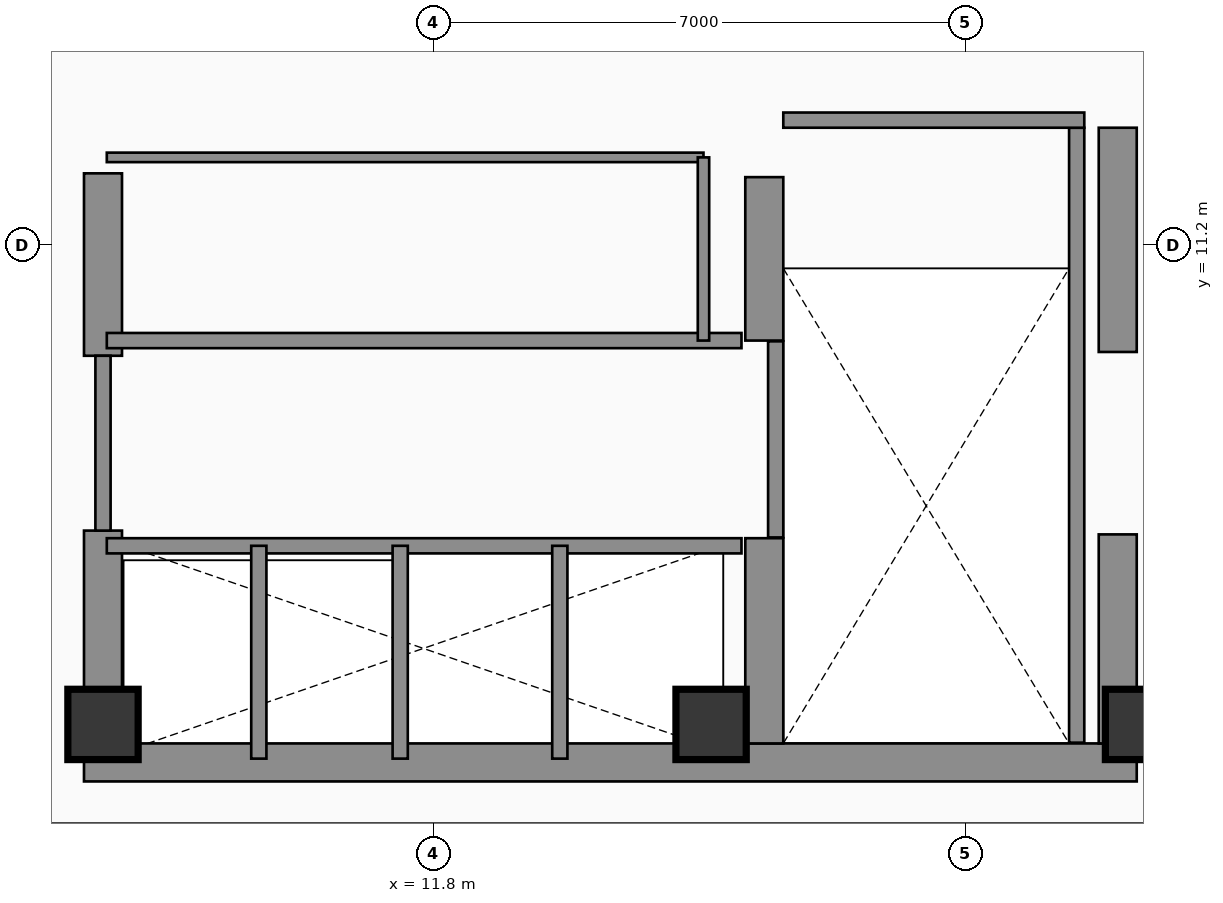
"""IFC4 building model, lengths in metres.
Left out: names, types, materials, properties, quantities, classifications, styles, units other than length and angle.
Written with IfcOpenShell. Run it as: python <this file> out.ifc"""

import sys

from ifc_helpers import new_model, si_unit, direction, frame, frame_2d, origin, origin_2d, place, context, subcontext, project, spatial, rectangle, extrude, element, fill, save


model = new_model("IFC4")
c1 = context("Model", 3, precision=1e-05, world=origin(), true_north=direction((0.0, 1.0)))
c2 = subcontext(c1, "Body", "Model", "MODEL_VIEW")
j1 = project(units=[si_unit("LENGTHUNIT", "METRE"), si_unit("PLANEANGLEUNIT", "RADIAN")], contexts=[c1])
p1 = place(None, origin())
s1 = spatial("IfcSite", under=j1, at=p1, CompositionType="ELEMENT")
p2 = place(p1, origin())
s2 = spatial("IfcBuilding", under=s1, at=p2, CompositionType="ELEMENT")
p3 = place(p2, frame((0.0, 0.0, 344.2)))
s3 = spatial("IfcBuildingStorey", under=s2, at=p3, CompositionType="ELEMENT", Elevation=344.2)
p4 = place(p3, frame((7.2, 4.4, 0.0), z_axis=(0.0, 0.0, 1.0), x_axis=(1.0, 0.0, 0.0)))
e1 = element("IfcWall", 1, at=p4, inside=s3, PredefinedType="SHEAR", context=c2, shape_type="SweptSolid", body=[
    extrude(rectangle(XDim=13.85, YDim=0.5, at=frame_2d((6.925, 0.0))), origin(), (0.0, 0.0, 1.0), 3.66),
])
p5 = place(p3, frame((7.45, 4.65, 0.0), z_axis=(0.0, 0.0, 1.0), x_axis=(0.0, 1.0, 0.0)))
e2 = element("IfcWall", 2, at=p5, inside=s3, PredefinedType="SHEAR", context=c2, shape_type="SweptSolid", body=[
    extrude(rectangle(XDim=2.8, YDim=0.5, at=frame_2d((1.4, 0.0))), origin(), (0.0, 0.0, 1.0), 3.66),
])
p6 = place(p3, frame((7.45, 9.75, 0.0), z_axis=(0.0, 0.0, 1.0), x_axis=(0.0, 1.0, 0.0)))
e3 = element("IfcWall", 3, at=p6, inside=s3, PredefinedType="SHEAR", context=c2, shape_type="SweptSolid", body=[
    extrude(rectangle(XDim=2.4, YDim=0.5, at=frame_2d((1.2, 0.0))), origin(), (0.0, 0.0, 1.0), 3.66),
])
p7 = place(p3, frame((20.8, 4.65, 0.0), z_axis=(0.0, 0.0, 1.0), x_axis=(0.0, 1.0, 0.0)))
e4 = element("IfcWall", 4, at=p7, inside=s3, PredefinedType="SHEAR", context=c2, shape_type="SweptSolid", body=[
    extrude(rectangle(XDim=2.75, YDim=0.5, at=frame_2d((1.375, 0.0))), origin(), (0.0, 0.0, 1.0), 3.66),
])
p8 = place(p3, frame((20.8, 9.8, 0.0), z_axis=(0.0, 0.0, 1.0), x_axis=(0.0, 1.0, 0.0)))
e5 = element("IfcWall", 5, at=p8, inside=s3, PredefinedType="SHEAR", context=c2, shape_type="SweptSolid", body=[
    extrude(rectangle(XDim=2.95, YDim=0.5, at=frame_2d((1.475, 0.0))), origin(), (0.0, 0.0, 1.0), 3.66),
])
p9 = place(p3, frame((16.15, 4.65, 0.0), z_axis=(0.0, 0.0, 1.0), x_axis=(0.0, 1.0, 0.0)))
e6 = element("IfcWall", 6, at=p9, inside=s3, PredefinedType="SHEAR", context=c2, shape_type="SweptSolid", body=[
    extrude(rectangle(XDim=2.7, YDim=0.5, at=frame_2d((1.35, 0.0))), origin(), (0.0, 0.0, 1.0), 3.66),
])
p10 = place(p3, frame((16.15, 9.95, 0.0), z_axis=(0.0, 0.0, 1.0), x_axis=(0.0, 1.0, 0.0)))
e7 = element("IfcWall", 7, at=p10, inside=s3, PredefinedType="SHEAR", context=c2, shape_type="SweptSolid", body=[
    extrude(rectangle(XDim=2.15, YDim=0.5, at=frame_2d((1.075, 0.0))), origin(), (0.0, 0.0, 1.0), 3.66),
])
for number, where, z_axis, x_axis in (
    (8, (7.45, 4.9, 0.0), (0.0, 0.0, 1.0), (1.0, 0.0, 0.0)),
    (9, (15.45, 4.9, 0.0), (0.0, 0.0, 1.0), (1.0, 0.0, 0.0)),
    (10, (21.1, 4.9, 0.0), (0.0, 0.0, 1.0), (1.0, 0.0, 0.0)),
):
    element("IfcColumn", number, at=place(p3, frame(where, z_axis=z_axis, x_axis=x_axis)), inside=s3, PredefinedType="COLUMN", context=c2, shape_type="SweptSolid", body=[
        extrude(rectangle(XDim=0.9, YDim=0.9, at=origin_2d()), origin(), (0.0, 0.0, 1.0), 3.66),
    ])
p11 = place(p3, frame((16.3, 7.36, 0.0), z_axis=(0.0, 0.0, 1.0), x_axis=(0.0, 1.0, 0.0)))
e11 = element("IfcWall", 11, at=p11, inside=s3, PredefinedType="SHEAR", context=c2, shape_type="SweptSolid", body=[
    extrude(rectangle(XDim=2.58, YDim=0.2, at=frame_2d((1.29, 0.0))), origin(), (0.0, 0.0, 1.0), 3.66),
])
p12 = place(p3, frame((20.26, 4.66, 0.0), z_axis=(0.0, 0.0, 1.0), x_axis=(0.0, 1.0, 0.0)))
e12 = element("IfcWall", 12, at=p12, inside=s3, PredefinedType="SHEAR", context=c2, shape_type="SweptSolid", body=[
    extrude(rectangle(XDim=8.09, YDim=0.2, at=frame_2d((4.045, 0.0))), origin(), (0.0, 0.0, 1.0), 3.66),
])
p13 = place(p3, frame((16.4, 12.85, 0.0), z_axis=(0.0, 0.0, 1.0), x_axis=(1.0, 0.0, 0.0)))
e13 = element("IfcWall", 13, at=p13, inside=s3, PredefinedType="PARTITIONING", context=c2, shape_type="SweptSolid", body=[
    extrude(rectangle(XDim=3.96, YDim=0.2, at=frame_2d((1.98, 0.0))), origin(), (0.0, 0.0, 1.0), 3.66),
])
p14 = place(p13, frame((1.304, 0.0, 0.0)))
e14 = element("IfcOpeningElement", 14, at=p14, cuts=e13, PredefinedType="OPENING", context=c2, shape_type="SweptSolid", body=[
    extrude(rectangle(XDim=1.1, YDim=2.2, at=frame_2d((0.55, 1.1))), frame((0.0, 0.11, 0.0), z_axis=(0.0, -1.0, 0.0), x_axis=(1.0, 0.0, 0.0)), (0.0, 0.0, 1.0), 0.22),
])
p15 = place(p3, frame((7.5, 7.25, 0.0), z_axis=(0.0, 0.0, 1.0), x_axis=(1.0, 0.0, 0.0)))
e15 = element("IfcWall", 15, at=p15, inside=s3, PredefinedType="PARTITIONING", context=c2, shape_type="SweptSolid", body=[
    extrude(rectangle(XDim=8.35, YDim=0.2, at=frame_2d((4.175, 0.0))), origin(), (0.0, 0.0, 1.0), 3.66),
])
p16 = place(p15, frame((0.53, 0.0, 0.0)))
e16 = element("IfcOpeningElement", 16, at=p16, cuts=e15, PredefinedType="OPENING", context=c2, shape_type="SweptSolid", body=[
    extrude(rectangle(XDim=1.1, YDim=2.2, at=frame_2d((0.55, 1.1))), frame((0.0, 0.11, 0.0), z_axis=(0.0, -1.0, 0.0), x_axis=(1.0, 0.0, 0.0)), (0.0, 0.0, 1.0), 0.22),
])
p17 = place(p15, frame((2.37, 0.0, 0.0)))
e17 = element("IfcOpeningElement", 17, at=p17, cuts=e15, PredefinedType="OPENING", context=c2, shape_type="SweptSolid", body=[
    extrude(rectangle(XDim=1.1, YDim=2.2, at=frame_2d((0.55, 1.1))), frame((0.0, 0.11, 0.0), z_axis=(0.0, -1.0, 0.0), x_axis=(1.0, 0.0, 0.0)), (0.0, 0.0, 1.0), 0.22),
])
p18 = place(p15, frame((4.33, 0.0, 0.0)))
e18 = element("IfcOpeningElement", 18, at=p18, cuts=e15, PredefinedType="OPENING", context=c2, shape_type="SweptSolid", body=[
    extrude(rectangle(XDim=1.1, YDim=2.2, at=frame_2d((0.55, 1.1))), frame((0.0, 0.11, 0.0), z_axis=(0.0, -1.0, 0.0), x_axis=(1.0, 0.0, 0.0)), (0.0, 0.0, 1.0), 0.22),
])
p19 = place(p15, frame((6.5, 0.0, 0.0)))
e19 = element("IfcOpeningElement", 19, at=p19, cuts=e15, PredefinedType="OPENING", context=c2, shape_type="SweptSolid", body=[
    extrude(rectangle(XDim=1.1, YDim=2.2, at=frame_2d((0.55, 1.1))), frame((0.0, 0.11, 0.0), z_axis=(0.0, -1.0, 0.0), x_axis=(1.0, 0.0, 0.0)), (0.0, 0.0, 1.0), 0.22),
])
p20 = place(p3, frame((7.5, 9.95, 0.0), z_axis=(0.0, 0.0, 1.0), x_axis=(1.0, 0.0, 0.0)))
e20 = element("IfcWall", 20, at=p20, inside=s3, PredefinedType="PARTITIONING", context=c2, shape_type="SweptSolid", body=[
    extrude(rectangle(XDim=8.35, YDim=0.2, at=frame_2d((4.175, 0.0))), origin(), (0.0, 0.0, 1.0), 3.66),
])
for number, where, z_axis, x_axis in (
    (21, (9.5, 4.45, 0.0), (0.0, 0.0, 1.0), (0.0, 1.0, 0.0)),
    (22, (11.36, 4.45, 0.0), (0.0, 0.0, 1.0), (0.0, 1.0, 0.0)),
    (23, (13.46, 4.45, 0.0), (0.0, 0.0, 1.0), (0.0, 1.0, 0.0)),
):
    element("IfcWall", number, at=place(p3, frame(where, z_axis=z_axis, x_axis=x_axis)), inside=s3, PredefinedType="PARTITIONING", context=c2, shape_type="SweptSolid", body=[
        extrude(rectangle(XDim=2.8, YDim=0.2, at=frame_2d((1.4, 0.0))), origin(), (0.0, 0.0, 1.0), 3.66),
    ])
p21 = place(p3, frame((7.45, 7.45, 0.0), z_axis=(0.0, 0.0, 1.0), x_axis=(0.0, 1.0, 0.0)))
e24 = element("IfcWall", 24, at=p21, inside=s3, PredefinedType="PARTITIONING", context=c2, shape_type="SweptSolid", body=[
    extrude(rectangle(XDim=2.3, YDim=0.2, at=frame_2d((1.15, 0.0))), origin(), (0.0, 0.0, 1.0), 2.64),
])
p22 = place(p21, frame((0.633, 0.0, 0.0)))
e25 = element("IfcOpeningElement", 25, at=p22, cuts=e24, PredefinedType="OPENING", context=c2, shape_type="SweptSolid", body=[
    extrude(rectangle(XDim=1.2, YDim=2.25, at=frame_2d((0.6, 1.125))), frame((0.0, 0.11, 0.0), z_axis=(0.0, -1.0, 0.0), x_axis=(1.0, 0.0, 0.0)), (0.0, 0.0, 1.0), 0.22),
])
p23 = place(p3, frame((7.5, 12.36, 0.0), z_axis=(0.0, 0.0, 1.0), x_axis=(1.0, 0.0, 0.0)))
e26 = element("IfcWall", 26, at=p23, inside=s3, PredefinedType="PARTITIONING", context=c2, shape_type="SweptSolid", body=[
    extrude(rectangle(XDim=7.85, YDim=0.125, at=frame_2d((3.925, 0.0))), origin(), (0.0, 0.0, 1.0), 3.66),
])
p24 = place(p23, frame((3.775, 0.0, 0.0)))
e27 = element("IfcOpeningElement", 27, at=p24, cuts=e26, PredefinedType="OPENING", context=c2, shape_type="SweptSolid", body=[
    extrude(rectangle(XDim=0.95, YDim=2.15, at=frame_2d((0.475, 1.075))), frame((0.0, 0.073, 0.0), z_axis=(0.0, -1.0, 0.0), x_axis=(1.0, 0.0, 0.0)), (0.0, 0.0, 1.0), 0.145),
])
p25 = place(p3, frame((15.35, 9.95, 0.0), z_axis=(0.0, 0.0, 1.0), x_axis=(0.0, 1.0, 0.0)))
e28 = element("IfcWall", 28, at=p25, inside=s3, PredefinedType="PARTITIONING", context=c2, shape_type="SweptSolid", body=[
    extrude(rectangle(XDim=2.41, YDim=0.15, at=frame_2d((1.205, 0.0))), origin(), (0.0, 0.0, 1.0), 3.66),
])
p26 = place(p14, frame((1.1, 0.0, 0.0), z_axis=(0.0, 0.0, 1.0), x_axis=(-1.0, 0.0, 0.0)))
e29 = element("IfcDoor", 29, at=p26, inside=s3, OperationType="SINGLE_SWING_LEFT", PredefinedType="DOOR", context=c2, shape_type="SweptSolid", body=[
    extrude(rectangle(XDim=1.1, YDim=2.2, at=frame_2d((0.55, 1.1))), frame((0.0, 0.025, 0.0), z_axis=(0.0, -1.0, 0.0), x_axis=(1.0, 0.0, 0.0)), (0.0, 0.0, 1.0), 0.05),
])
fill(e14, e29)
p27 = place(p16, origin())
e30 = element("IfcDoor", 30, at=p27, inside=s3, OperationType="SLIDING_TO_LEFT", PredefinedType="DOOR", context=c2, shape_type="SweptSolid", body=[
    extrude(rectangle(XDim=1.1, YDim=2.2, at=frame_2d((0.55, 1.1))), frame((0.0, 0.025, 0.0), z_axis=(0.0, -1.0, 0.0), x_axis=(1.0, 0.0, 0.0)), (0.0, 0.0, 1.0), 0.05),
])
fill(e16, e30)
p28 = place(p17, origin())
e31 = element("IfcDoor", 31, at=p28, inside=s3, OperationType="SLIDING_TO_LEFT", PredefinedType="DOOR", context=c2, shape_type="SweptSolid", body=[
    extrude(rectangle(XDim=1.1, YDim=2.2, at=frame_2d((0.55, 1.1))), frame((0.0, 0.025, 0.0), z_axis=(0.0, -1.0, 0.0), x_axis=(1.0, 0.0, 0.0)), (0.0, 0.0, 1.0), 0.05),
])
fill(e17, e31)
p29 = place(p18, origin())
e32 = element("IfcDoor", 32, at=p29, inside=s3, OperationType="SLIDING_TO_LEFT", PredefinedType="DOOR", context=c2, shape_type="SweptSolid", body=[
    extrude(rectangle(XDim=1.1, YDim=2.2, at=frame_2d((0.55, 1.1))), frame((0.0, 0.025, 0.0), z_axis=(0.0, -1.0, 0.0), x_axis=(1.0, 0.0, 0.0)), (0.0, 0.0, 1.0), 0.05),
])
fill(e18, e32)
p30 = place(p19, origin())
e33 = element("IfcDoor", 33, at=p30, inside=s3, OperationType="SLIDING_TO_LEFT", PredefinedType="DOOR", context=c2, shape_type="SweptSolid", body=[
    extrude(rectangle(XDim=1.1, YDim=2.2, at=frame_2d((0.55, 1.1))), frame((0.0, 0.025, 0.0), z_axis=(0.0, -1.0, 0.0), x_axis=(1.0, 0.0, 0.0)), (0.0, 0.0, 1.0), 0.05),
])
fill(e19, e33)
p31 = place(p22, frame((1.2, 0.0, 0.0), z_axis=(0.0, 0.0, 1.0), x_axis=(-1.0, 0.0, 0.0)))
e34 = element("IfcDoor", 34, at=p31, inside=s3, OperationType="SINGLE_SWING_LEFT", PredefinedType="DOOR", context=c2, shape_type="SweptSolid", body=[
    extrude(rectangle(XDim=1.2, YDim=2.25, at=frame_2d((0.6, 1.125))), frame((0.0, 0.025, 0.0), z_axis=(0.0, -1.0, 0.0), x_axis=(1.0, 0.0, 0.0)), (0.0, 0.0, 1.0), 0.05),
])
fill(e25, e34)
p32 = place(p24, origin())
e35 = element("IfcDoor", 35, at=p32, inside=s3, OperationType="SINGLE_SWING_RIGHT", PredefinedType="DOOR", context=c2, shape_type="SweptSolid", body=[
    extrude(rectangle(XDim=0.95, YDim=2.15, at=frame_2d((0.475, 1.075))), frame((0.0, 0.025, 0.0), z_axis=(0.0, -1.0, 0.0), x_axis=(1.0, 0.0, 0.0)), (0.0, 0.0, 1.0), 0.05),
])
fill(e27, e35)
save(model, sys.argv[1])
